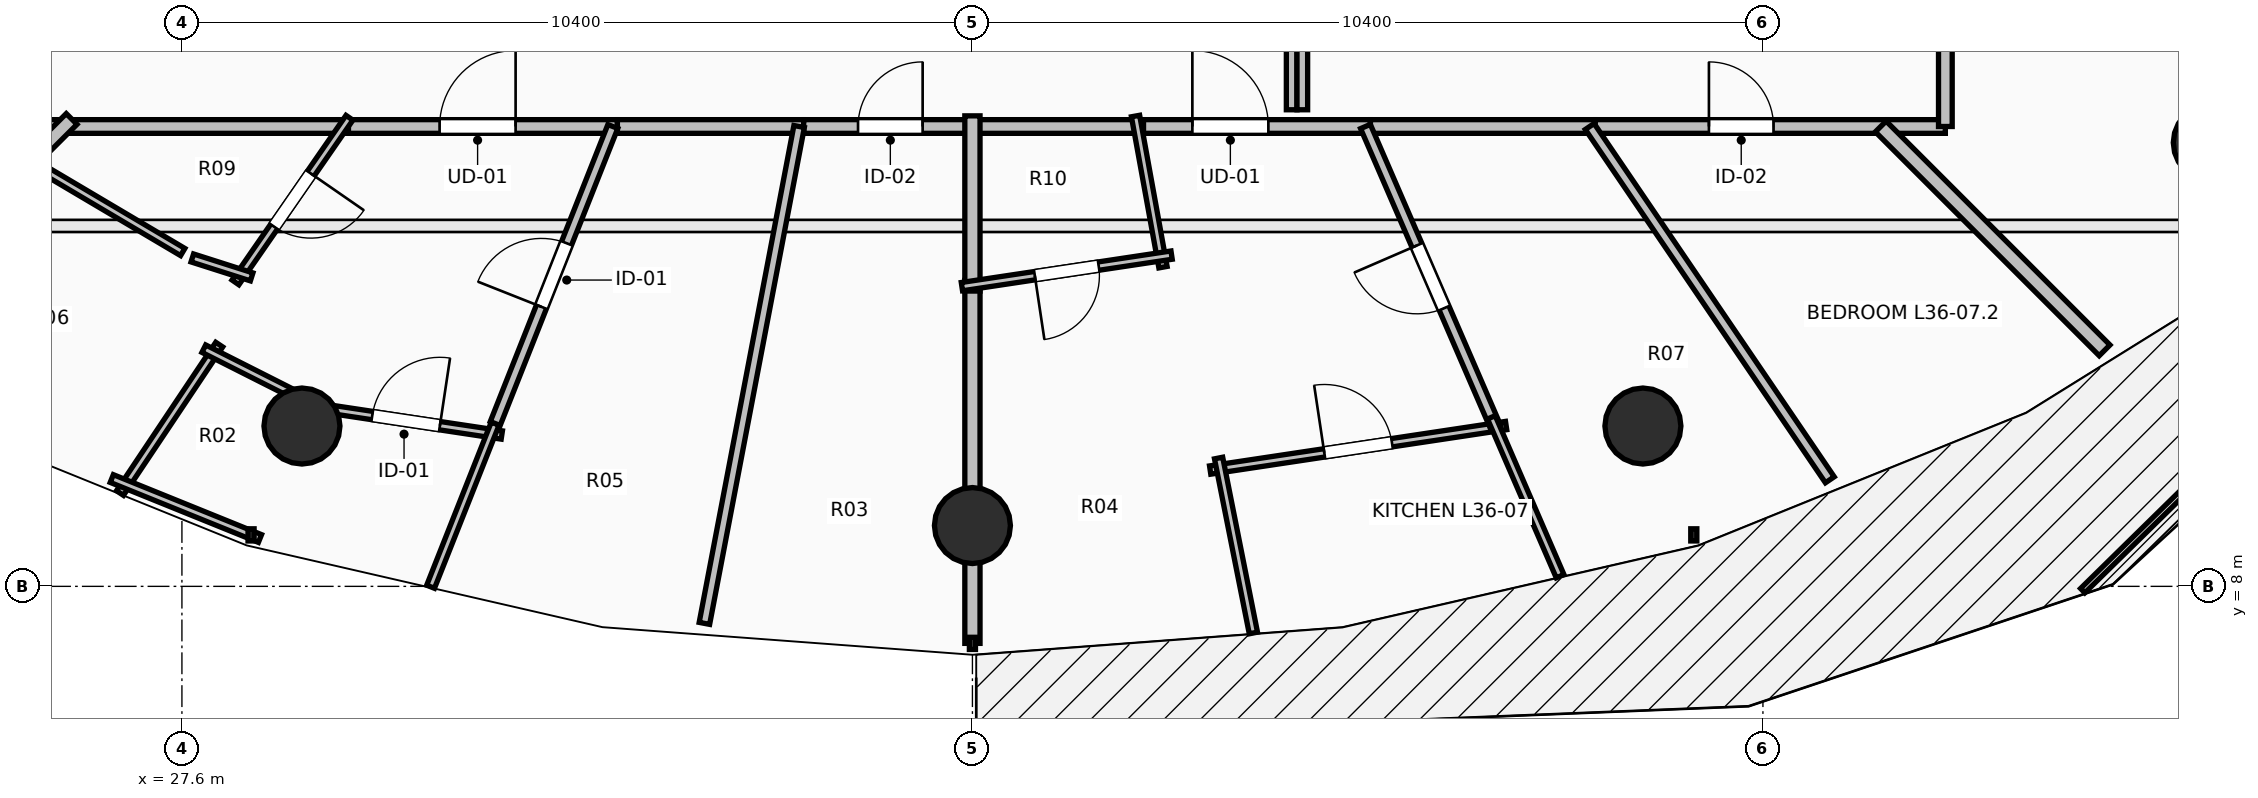
"""IFC4 building model, lengths in metres.
Left out: names, types, materials, properties, quantities, classifications, styles, units other than length and angle.
Written with IfcOpenShell. Run it as: python <this file> out.ifc"""

import sys

from ifc_helpers import new_model, si_unit, direction, frame, frame_2d, origin, origin_2d, place, context, subcontext, project, spatial, rectangle, circle, extrude, element, fill, save


model = new_model("IFC4")
c1 = context("Model", 3, precision=1e-05, world=origin(), true_north=direction((0.0, 1.0)))
c2 = subcontext(c1, "Body", "Model", "MODEL_VIEW")
j1 = project(units=[si_unit("LENGTHUNIT", "METRE"), si_unit("PLANEANGLEUNIT", "RADIAN")], contexts=[c1])
p1 = place(None, origin())
s1 = spatial("IfcSite", under=j1, at=p1, CompositionType="ELEMENT")
p2 = place(p1, origin())
s2 = spatial("IfcBuilding", under=s1, at=p2, CompositionType="ELEMENT")
p3 = place(p2, frame((0.0, 0.0, 136.1)))
s3 = spatial("IfcBuildingStorey", under=s2, at=p3, CompositionType="ELEMENT", Elevation=136.1)
for number, where, z_axis, x_axis in (
    (1, (29.179, 10.109, 0.0), (0.0, 0.0, 1.0), (-0.383, -0.924, 0.0)),
    (2, (38.0, 8.8, 0.0), (0.0, 0.0, 1.0), (0.0, -1.0, 0.0)),
    (3, (46.821, 10.109, 0.0), (0.0, 0.0, 1.0), (0.383, -0.924, 0.0)),
    (4, (54.299, 13.838, 0.0), (0.0, 0.0, 1.0), (0.707, -0.707, 0.0)),
):
    element("IfcColumn", number, at=place(p3, frame(where, z_axis=z_axis, x_axis=x_axis)), inside=s3, PredefinedType="COLUMN", context=c2, shape_type="SweptSolid", body=[
        extrude(circle(Radius=0.5, at=origin_2d()), origin(), (0.0, 0.0, 1.0), 3.5),
    ])
p4 = place(p3, frame((25.2, 14.05, 0.0), z_axis=(0.0, 0.0, 1.0), x_axis=(1.0, 0.0, 0.0)))
e5 = element("IfcWall", 5, at=p4, inside=s3, PredefinedType="PARTITIONING", context=c2, shape_type="SweptSolid", body=[
    extrude(rectangle(XDim=0.91, YDim=0.18, at=frame_2d((0.455, 0.0))), origin(), (0.0, 0.0, 1.0), 2.874),
])
p5 = place(p3, frame((29.651, 14.05, 0.0), z_axis=(0.0, 0.0, 1.0), x_axis=(1.0, 0.0, 0.0)))
e6 = element("IfcWall", 6, at=p5, inside=s3, PredefinedType="PARTITIONING", context=c2, shape_type="SweptSolid", body=[
    extrude(rectangle(XDim=3.678, YDim=0.18, at=frame_2d((1.839, 0.0))), origin(), (0.0, 0.0, 1.0), 2.922),
])
p6 = place(p5, frame((1.339, 0.0, 0.0)))
e7 = element("IfcOpeningElement", 7, at=p6, cuts=e6, PredefinedType="OPENING", context=c2, shape_type="SweptSolid", body=[
    extrude(rectangle(XDim=1.0, YDim=2.15, at=frame_2d((0.5, 1.075))), frame((0.0, 0.105, 0.0), z_axis=(0.0, -1.0, 0.0), x_axis=(1.0, 0.0, 0.0)), (0.0, 0.0, 1.0), 0.21),
])
p7 = place(p3, frame((25.97, 14.05, 0.0), z_axis=(0.0, 0.0, 1.0), x_axis=(1.0, 0.0, 0.0)))
e8 = element("IfcWall", 8, at=p7, inside=s3, PredefinedType="PARTITIONING", context=c2, shape_type="SweptSolid", body=[
    extrude(rectangle(XDim=3.821, YDim=0.18, at=frame_2d((1.911, 0.0))), origin(), (0.0, 0.0, 1.0), 2.432),
])
p8 = place(p3, frame((33.329, 14.05, 0.0), z_axis=(0.0, 0.0, 1.0), x_axis=(1.0, 0.0, 0.0)))
e9 = element("IfcWall", 9, at=p8, inside=s3, PredefinedType="PARTITIONING", context=c2, shape_type="SweptSolid", body=[
    extrude(rectangle(XDim=2.451, YDim=0.18, at=frame_2d((1.226, 0.0))), origin(), (0.0, 0.0, 1.0), 2.922),
])
p9 = place(p3, frame((35.78, 14.05, 0.0), z_axis=(0.0, 0.0, 1.0), x_axis=(1.0, 0.0, 0.0)))
e10 = element("IfcWall", 10, at=p9, inside=s3, PredefinedType="PARTITIONING", context=c2, shape_type="SweptSolid", body=[
    extrude(rectangle(XDim=2.28, YDim=0.18, at=frame_2d((1.14, 0.0))), origin(), (0.0, 0.0, 1.0), 2.922),
])
p10 = place(p9, frame((0.715, 0.0, 0.0)))
e11 = element("IfcOpeningElement", 11, at=p10, cuts=e10, PredefinedType="OPENING", context=c2, shape_type="SweptSolid", body=[
    extrude(rectangle(XDim=0.85, YDim=2.1, at=frame_2d((0.425, 1.05))), frame((0.0, 0.105, 0.0), z_axis=(0.0, -1.0, 0.0), x_axis=(1.0, 0.0, 0.0)), (0.0, 0.0, 1.0), 0.21),
])
p11 = place(p3, frame((40.111, 14.05, 0.0), z_axis=(0.0, 0.0, 1.0), x_axis=(1.0, 0.0, 0.0)))
e12 = element("IfcWall", 12, at=p11, inside=s3, PredefinedType="PARTITIONING", context=c2, shape_type="SweptSolid", body=[
    extrude(rectangle(XDim=3.125, YDim=0.18, at=frame_2d((1.562, 0.0))), origin(), (0.0, 0.0, 1.0), 3.24),
])
p12 = place(p11, frame((0.782, 0.0, 0.0)))
e13 = element("IfcOpeningElement", 13, at=p12, cuts=e12, PredefinedType="OPENING", context=c2, shape_type="SweptSolid", body=[
    extrude(rectangle(XDim=1.0, YDim=2.15, at=frame_2d((0.5, 1.075))), frame((0.0, 0.105, 0.0), z_axis=(0.0, -1.0, 0.0), x_axis=(1.0, 0.0, 0.0)), (0.0, 0.0, 1.0), 0.21),
])
p13 = place(p3, frame((37.92, 14.05, 0.0), z_axis=(0.0, 0.0, 1.0), x_axis=(1.0, 0.0, 0.0)))
e14 = element("IfcWall", 14, at=p13, inside=s3, PredefinedType="PARTITIONING", context=c2, shape_type="SweptSolid", body=[
    extrude(rectangle(XDim=2.331, YDim=0.18, at=frame_2d((1.166, 0.0))), origin(), (0.0, 0.0, 1.0), 2.922),
])
p14 = place(p3, frame((43.236, 14.05, 0.0), z_axis=(0.0, 0.0, 1.0), x_axis=(1.0, 0.0, 0.0)))
e15 = element("IfcWall", 15, at=p14, inside=s3, PredefinedType="PARTITIONING", context=c2, shape_type="SweptSolid", body=[
    extrude(rectangle(XDim=2.958, YDim=0.18, at=frame_2d((1.479, 0.0))), origin(), (0.0, 0.0, 1.0), 2.432),
])
p15 = place(p3, frame((46.194, 14.05, 0.0), z_axis=(0.0, 0.0, 1.0), x_axis=(1.0, 0.0, 0.0)))
e16 = element("IfcWall", 16, at=p15, inside=s3, PredefinedType="PARTITIONING", context=c2, shape_type="SweptSolid", body=[
    extrude(rectangle(XDim=3.841, YDim=0.18, at=frame_2d((1.92, 0.0))), origin(), (0.0, 0.0, 1.0), 2.432),
])
p16 = place(p15, frame((1.496, 0.0, 0.0)))
e17 = element("IfcOpeningElement", 17, at=p16, cuts=e16, PredefinedType="OPENING", context=c2, shape_type="SweptSolid", body=[
    extrude(rectangle(XDim=0.85, YDim=2.1, at=frame_2d((0.425, 1.05))), frame((0.0, 0.105, 0.0), z_axis=(0.0, -1.0, 0.0), x_axis=(1.0, 0.0, 0.0)), (0.0, 0.0, 1.0), 0.21),
])
p17 = place(p3, frame((50.035, 14.05, 0.0), z_axis=(0.0, 0.0, 1.0), x_axis=(1.0, 0.0, 0.0)))
e18 = element("IfcWall", 18, at=p17, inside=s3, PredefinedType="PARTITIONING", context=c2, shape_type="SweptSolid", body=[
    extrude(rectangle(XDim=0.765, YDim=0.18, at=frame_2d((0.383, 0.0))), origin(), (0.0, 0.0, 1.0), 2.874),
])
p18 = place(p3, frame((50.8, 14.05, 0.0), z_axis=(0.0, 0.0, 1.0), x_axis=(0.0, 1.0, 0.0)))
e19 = element("IfcWall", 19, at=p18, inside=s3, PredefinedType="PARTITIONING", context=c2, shape_type="SweptSolid", body=[
    extrude(rectangle(XDim=10.5, YDim=0.18, at=frame_2d((5.25, 0.0))), origin(), (0.0, 0.0, 1.0), 2.432),
])
p19 = place(p18, frame((4.75, 0.0, 0.0)))
e20 = element("IfcOpeningElement", 20, at=p19, cuts=e19, PredefinedType="OPENING", context=c2, shape_type="SweptSolid", body=[
    extrude(rectangle(XDim=1.0, YDim=2.15, at=frame_2d((0.5, 1.075))), frame((0.0, 0.105, 0.0), z_axis=(0.0, -1.0, 0.0), x_axis=(1.0, 0.0, 0.0)), (0.0, 0.0, 1.0), 0.21),
])
p20 = place(p3, frame((25.538, 13.538, 0.0), z_axis=(0.0, 0.0, 1.0), x_axis=(0.707106781187, 0.707106781187, 0.0)))
e21 = element("IfcWall", 21, at=p20, inside=s3, PredefinedType="PARTITIONING", context=c2, shape_type="SweptSolid", body=[
    extrude(rectangle(XDim=0.864, YDim=0.2, at=frame_2d((0.432, 0.0))), origin(), (0.0, 0.0, 1.0), 2.874),
])
p21 = place(p3, frame((29.804, 14.165, 0.0), z_axis=(0.0, 0.0, 1.0), x_axis=(-0.569156972472, -0.822228885826, 0.0)))
e22 = element("IfcWall", 22, at=p21, inside=s3, PredefinedType="PARTITIONING", context=c2, shape_type="SweptSolid", body=[
    extrude(rectangle(XDim=2.635, YDim=0.11, at=frame_2d((1.317, 0.0))), origin(), (0.0, 0.0, 1.0), 2.432),
])
p22 = place(p21, frame((0.892, 0.0, 0.0)))
e23 = element("IfcOpeningElement", 23, at=p22, cuts=e22, PredefinedType="OPENING", context=c2, shape_type="SweptSolid", body=[
    extrude(rectangle(XDim=0.85, YDim=2.1, at=frame_2d((0.425, 1.05))), frame((0.0, 0.07, 0.0), z_axis=(0.0, -1.0, 0.0), x_axis=(1.0, 0.0, 0.0)), (0.0, 0.0, 1.0), 0.14),
])
p23 = place(p3, frame((28.517, 12.071, 0.0), z_axis=(0.0, 0.0, 1.0), x_axis=(-0.952627998304, 0.304137956932, 0.0)))
e24 = element("IfcWall", 24, at=p23, inside=s3, PredefinedType="PARTITIONING", context=c2, shape_type="SweptSolid", body=[
    extrude(rectangle(XDim=0.82, YDim=0.11, at=frame_2d((0.41, 0.0))), origin(), (0.0, 0.0, 1.0), 2.432),
])
p24 = place(p3, frame((27.611, 12.399, 0.0), z_axis=(0.0, 0.0, 1.0), x_axis=(-0.860546797705, 0.509371386082, 0.0)))
e25 = element("IfcWall", 25, at=p24, inside=s3, PredefinedType="PARTITIONING", context=c2, shape_type="SweptSolid", body=[
    extrude(rectangle(XDim=2.485, YDim=0.11, at=frame_2d((1.242, 0.0))), origin(), (0.0, 0.0, 1.0), 2.874),
])
p25 = place(p3, frame((26.785, 9.228, 0.0), z_axis=(0.0, 0.0, 1.0), x_axis=(0.555802936367, 0.831314077786, 0.0)))
e26 = element("IfcWall", 26, at=p25, inside=s3, PredefinedType="PARTITIONING", context=c2, shape_type="SweptSolid", body=[
    extrude(rectangle(XDim=2.349, YDim=0.11, at=frame_2d((1.175, 0.0))), origin(), (0.0, 0.0, 1.0), 2.728),
])
p26 = place(p3, frame((27.888, 11.127, 0.0), z_axis=(0.0, 0.0, 1.0), x_axis=(0.892534718882, -0.450978686403, 0.0)))
e27 = element("IfcWall", 27, at=p26, inside=s3, PredefinedType="PARTITIONING", context=c2, shape_type="SweptSolid", body=[
    extrude(rectangle(XDim=1.865, YDim=0.11, at=frame_2d((0.933, 0.0))), origin(), (0.0, 0.0, 1.0), 2.432),
])
p27 = place(p3, frame((29.29, 10.37, 0.0), z_axis=(0.0, 0.0, 1.0), x_axis=(0.988887788943, -0.148663851958, 0.0)))
e28 = element("IfcWall", 28, at=p27, inside=s3, PredefinedType="PARTITIONING", context=c2, shape_type="SweptSolid", body=[
    extrude(rectangle(XDim=2.547, YDim=0.11, at=frame_2d((1.273, 0.0))), origin(), (0.0, 0.0, 1.0), 3.24),
])
p28 = place(p27, frame((0.823, 0.0, 0.0)))
e29 = element("IfcOpeningElement", 29, at=p28, cuts=e28, PredefinedType="OPENING", context=c2, shape_type="SweptSolid", body=[
    extrude(rectangle(XDim=0.9, YDim=2.1, at=frame_2d((0.45, 1.05))), frame((0.0, 0.07, 0.0), z_axis=(0.0, -1.0, 0.0), x_axis=(1.0, 0.0, 0.0)), (0.0, 0.0, 1.0), 0.14),
])
p29 = place(p3, frame((31.721, 10.142, 0.0), z_axis=(0.0, 0.0, 1.0), x_axis=(-0.368016079814, -0.929819426017, 0.0)))
e30 = element("IfcWall", 30, at=p29, inside=s3, PredefinedType="PARTITIONING", context=c2, shape_type="SweptSolid", body=[
    extrude(rectangle(XDim=2.309, YDim=0.11, at=frame_2d((1.155, 0.0))), origin(), (0.0, 0.0, 1.0), 2.728),
])
p30 = place(p3, frame((26.677, 9.418, 0.0), z_axis=(0.0, 0.0, 1.0), x_axis=(0.926947774479, -0.375190382857, 0.0)))
e31 = element("IfcWall", 31, at=p30, inside=s3, PredefinedType="PARTITIONING", context=c2, shape_type="SweptSolid", body=[
    extrude(rectangle(XDim=2.103, YDim=0.11, at=frame_2d((1.052, 0.0))), origin(), (0.0, 0.0, 1.0), 3.24),
])
p31 = place(p3, frame((31.722, 10.142, 0.0), z_axis=(0.0, 0.0, 1.0), x_axis=(0.368143652048, 0.929768923688, 0.0)))
e32 = element("IfcWall", 32, at=p31, inside=s3, PredefinedType="PARTITIONING", context=c2, shape_type="SweptSolid", body=[
    extrude(rectangle(XDim=4.203, YDim=0.14, at=frame_2d((2.102, 0.0))), origin(), (0.0, 0.0, 1.0), 2.874),
])
p32 = place(p31, frame((1.652, 0.0, 0.0)))
e33 = element("IfcOpeningElement", 33, at=p32, cuts=e32, PredefinedType="OPENING", context=c2, shape_type="SweptSolid", body=[
    extrude(rectangle(XDim=0.9, YDim=2.1, at=frame_2d((0.45, 1.05))), frame((0.0, 0.085, 0.0), z_axis=(0.0, -1.0, 0.0), x_axis=(1.0, 0.0, 0.0)), (0.0, 0.0, 1.0), 0.17),
])
p33 = place(p3, frame((34.474, 7.513, 0.0), z_axis=(0.0, 0.0, 1.0), x_axis=(0.187211570084, 0.982319616025, 0.0)))
e34 = element("IfcWall", 34, at=p33, inside=s3, PredefinedType="PARTITIONING", context=c2, shape_type="SweptSolid", body=[
    extrude(rectangle(XDim=6.655, YDim=0.14, at=frame_2d((3.327, 0.0))), origin(), (0.0, 0.0, 1.0), 2.728),
])
p34 = place(p3, frame((38.0, 7.25, 0.0), z_axis=(0.0, 0.0, 1.0), x_axis=(0.0, 1.0, 0.0)))
e35 = element("IfcWall", 35, at=p34, inside=s3, PredefinedType="PARTITIONING", context=c2, shape_type="SweptSolid", body=[
    extrude(rectangle(XDim=4.775, YDim=0.2, at=frame_2d((2.387, 0.0))), origin(), (0.0, 0.0, 1.0), 2.874),
])
p35 = place(p3, frame((38.0, 11.885, 0.0), z_axis=(0.0, 0.0, 1.0), x_axis=(0.0, 1.0, 0.0)))
e36 = element("IfcWall", 36, at=p35, inside=s3, PredefinedType="PARTITIONING", context=c2, shape_type="SweptSolid", body=[
    extrude(rectangle(XDim=2.305, YDim=0.2, at=frame_2d((1.152, 0.0))), origin(), (0.0, 0.0, 1.0), 2.922),
])
p36 = place(p3, frame((40.146, 14.188, 0.0), z_axis=(0.0, 0.0, 1.0), x_axis=(0.178662196449, -0.983910473346, 0.0)))
e37 = element("IfcWall", 37, at=p36, inside=s3, PredefinedType="PARTITIONING", context=c2, shape_type="SweptSolid", body=[
    extrude(rectangle(XDim=2.021, YDim=0.11, at=frame_2d((1.01, 0.0))), origin(), (0.0, 0.0, 1.0), 2.922),
])
p37 = place(p3, frame((40.62, 12.358, 0.0), z_axis=(0.0, 0.0, 1.0), x_axis=(-0.988884941862, -0.148682789046, 0.0)))
e38 = element("IfcWall", 38, at=p37, inside=s3, PredefinedType="PARTITIONING", context=c2, shape_type="SweptSolid", body=[
    extrude(rectangle(XDim=2.79, YDim=0.11, at=frame_2d((1.395, 0.0))), origin(), (0.0, 0.0, 1.0), 3.24),
])
p38 = place(p37, frame((0.97, 0.0, 0.0)))
e39 = element("IfcOpeningElement", 39, at=p38, cuts=e38, PredefinedType="OPENING", context=c2, shape_type="SweptSolid", body=[
    extrude(rectangle(XDim=0.85, YDim=2.1, at=frame_2d((0.425, 1.05))), frame((0.0, 0.07, 0.0), z_axis=(0.0, -1.0, 0.0), x_axis=(1.0, 0.0, 0.0)), (0.0, 0.0, 1.0), 0.14),
])
p39 = place(p3, frame((41.128, 9.53, 0.0), z_axis=(0.0, 0.0, 1.0), x_axis=(0.988884902331, 0.148683051965, 0.0)))
e40 = element("IfcWall", 40, at=p39, inside=s3, PredefinedType="PARTITIONING", context=c2, shape_type="SweptSolid", body=[
    extrude(rectangle(XDim=3.938, YDim=0.11, at=frame_2d((1.969, 0.0))), origin(), (0.0, 0.0, 1.0), 3.24),
])
p40 = place(p39, frame((1.519, 0.0, 0.0)))
e41 = element("IfcOpeningElement", 41, at=p40, cuts=e40, PredefinedType="OPENING", context=c2, shape_type="SweptSolid", body=[
    extrude(rectangle(XDim=0.9, YDim=2.1, at=frame_2d((0.45, 1.05))), frame((0.0, 0.07, 0.0), z_axis=(0.0, -1.0, 0.0), x_axis=(1.0, 0.0, 0.0)), (0.0, 0.0, 1.0), 0.14),
])
p41 = place(p3, frame((41.696, 7.387, 0.0), z_axis=(0.0, 0.0, 1.0), x_axis=(-0.194975537261, 0.980808105528, 0.0)))
e42 = element("IfcWall", 42, at=p41, inside=s3, PredefinedType="PARTITIONING", context=c2, shape_type="SweptSolid", body=[
    extrude(rectangle(XDim=2.346, YDim=0.11, at=frame_2d((1.173, 0.0))), origin(), (0.0, 0.0, 1.0), 2.728),
])
p42 = place(p3, frame((44.883, 10.095, 0.0), z_axis=(0.0, 0.0, 1.0), x_axis=(-0.397273563399, 0.917700232006, 0.0)))
e43 = element("IfcWall", 43, at=p42, inside=s3, PredefinedType="PARTITIONING", context=c2, shape_type="SweptSolid", body=[
    extrude(rectangle(XDim=4.31, YDim=0.14, at=frame_2d((2.155, 0.0))), origin(), (0.0, 0.0, 1.0), 2.432),
])
p43 = place(p42, frame((1.705, 0.0, 0.0)))
e44 = element("IfcOpeningElement", 44, at=p43, cuts=e43, PredefinedType="OPENING", context=c2, shape_type="SweptSolid", body=[
    extrude(rectangle(XDim=0.9, YDim=2.1, at=frame_2d((0.45, 1.05))), frame((0.0, 0.085, 0.0), z_axis=(0.0, -1.0, 0.0), x_axis=(1.0, 0.0, 0.0)), (0.0, 0.0, 1.0), 0.17),
])
p44 = place(p3, frame((45.732, 8.134, 0.0), z_axis=(0.0, 0.0, 1.0), x_axis=(-0.397125966554, 0.91776411277, 0.0)))
e45 = element("IfcWall", 45, at=p44, inside=s3, PredefinedType="PARTITIONING", context=c2, shape_type="SweptSolid", body=[
    extrude(rectangle(XDim=2.277, YDim=0.11, at=frame_2d((1.139, 0.0))), origin(), (0.0, 0.0, 1.0), 2.728),
])
p45 = place(p3, frame((49.28, 9.402, 0.0), z_axis=(0.0, 0.0, 1.0), x_axis=(-0.562106811751, 0.827064648128, 0.0)))
e46 = element("IfcWall", 46, at=p45, inside=s3, PredefinedType="PARTITIONING", context=c2, shape_type="SweptSolid", body=[
    extrude(rectangle(XDim=5.62, YDim=0.14, at=frame_2d((2.81, 0.0))), origin(), (0.0, 0.0, 1.0), 2.432),
])
p46 = place(p3, frame((52.895, 11.105, 0.0), z_axis=(0.0, 0.0, 1.0), x_axis=(-0.707106781187, 0.707106781187, 0.0)))
e47 = element("IfcWall", 47, at=p46, inside=s3, PredefinedType="PARTITIONING", context=c2, shape_type="SweptSolid", body=[
    extrude(rectangle(XDim=4.165, YDim=0.2, at=frame_2d((2.083, 0.0))), origin(), (0.0, 0.0, 1.0), 2.728),
])
for number, where, z_axis, x_axis in (
    (48, (42.2, 16.1, 0.0), (0.0, 0.0, 1.0), (0.0, -1.0, 0.0)),
    (49, (42.34, 14.27, 0.0), (0.0, 0.0, 1.0), (0.0, 1.0, 0.0)),
):
    element("IfcWall", number, at=place(p3, frame(where, z_axis=z_axis, x_axis=x_axis)), inside=s3, PredefinedType="PARTITIONING", context=c2, shape_type="SweptSolid", body=[
        extrude(rectangle(XDim=1.83, YDim=0.14, at=frame_2d((0.915, 0.0))), origin(), (0.0, 0.0, 1.0), 3.24),
    ])
p47 = place(p6, origin())
e50 = element("IfcDoor", 50, at=p47, inside=s3, OperationType="SINGLE_SWING_RIGHT", PredefinedType="DOOR", context=c2, shape_type="SweptSolid", body=[
    extrude(rectangle(XDim=1.0, YDim=2.15, at=frame_2d((0.5, 1.075))), frame((0.0, 0.025, 0.0), z_axis=(0.0, -1.0, 0.0), x_axis=(1.0, 0.0, 0.0)), (0.0, 0.0, 1.0), 0.05),
])
fill(e7, e50)
p48 = place(p12, origin())
e51 = element("IfcDoor", 51, at=p48, inside=s3, OperationType="SINGLE_SWING_LEFT", PredefinedType="DOOR", context=c2, shape_type="SweptSolid", body=[
    extrude(rectangle(XDim=1.0, YDim=2.15, at=frame_2d((0.5, 1.075))), frame((0.0, 0.025, 0.0), z_axis=(0.0, -1.0, 0.0), x_axis=(1.0, 0.0, 0.0)), (0.0, 0.0, 1.0), 0.05),
])
fill(e13, e51)
p49 = place(p22, origin())
e52 = element("IfcDoor", 52, at=p49, inside=s3, OperationType="SINGLE_SWING_LEFT", PredefinedType="DOOR", context=c2, shape_type="SweptSolid", body=[
    extrude(rectangle(XDim=0.85, YDim=2.1, at=frame_2d((0.425, 1.05))), frame((0.0, 0.025, 0.0), z_axis=(0.0, -1.0, 0.0), x_axis=(1.0, 0.0, 0.0)), (0.0, 0.0, 1.0), 0.05),
])
fill(e23, e52)
p50 = place(p28, origin())
e53 = element("IfcDoor", 53, at=p50, inside=s3, OperationType="SINGLE_SWING_RIGHT", PredefinedType="DOOR", context=c2, shape_type="SweptSolid", body=[
    extrude(rectangle(XDim=0.9, YDim=2.1, at=frame_2d((0.45, 1.05))), frame((0.0, 0.025, 0.0), z_axis=(0.0, -1.0, 0.0), x_axis=(1.0, 0.0, 0.0)), (0.0, 0.0, 1.0), 0.05),
])
fill(e29, e53)
p51 = place(p32, origin())
e54 = element("IfcDoor", 54, at=p51, inside=s3, OperationType="SINGLE_SWING_LEFT", PredefinedType="DOOR", context=c2, shape_type="SweptSolid", body=[
    extrude(rectangle(XDim=0.9, YDim=2.1, at=frame_2d((0.45, 1.05))), frame((0.0, 0.025, 0.0), z_axis=(0.0, -1.0, 0.0), x_axis=(1.0, 0.0, 0.0)), (0.0, 0.0, 1.0), 0.05),
])
fill(e33, e54)
p52 = place(p38, origin())
e55 = element("IfcDoor", 55, at=p52, inside=s3, OperationType="SINGLE_SWING_RIGHT", PredefinedType="DOOR", context=c2, shape_type="SweptSolid", body=[
    extrude(rectangle(XDim=0.85, YDim=2.1, at=frame_2d((0.425, 1.05))), frame((0.0, 0.025, 0.0), z_axis=(0.0, -1.0, 0.0), x_axis=(1.0, 0.0, 0.0)), (0.0, 0.0, 1.0), 0.05),
])
fill(e39, e55)
p53 = place(p40, origin())
e56 = element("IfcDoor", 56, at=p53, inside=s3, OperationType="SINGLE_SWING_LEFT", PredefinedType="DOOR", context=c2, shape_type="SweptSolid", body=[
    extrude(rectangle(XDim=0.9, YDim=2.1, at=frame_2d((0.45, 1.05))), frame((0.0, 0.025, 0.0), z_axis=(0.0, -1.0, 0.0), x_axis=(1.0, 0.0, 0.0)), (0.0, 0.0, 1.0), 0.05),
])
fill(e41, e56)
p54 = place(p43, origin())
e57 = element("IfcDoor", 57, at=p54, inside=s3, OperationType="SINGLE_SWING_RIGHT", PredefinedType="DOOR", context=c2, shape_type="SweptSolid", body=[
    extrude(rectangle(XDim=0.9, YDim=2.1, at=frame_2d((0.45, 1.05))), frame((0.0, 0.025, 0.0), z_axis=(0.0, -1.0, 0.0), x_axis=(1.0, 0.0, 0.0)), (0.0, 0.0, 1.0), 0.05),
])
fill(e44, e57)
p55 = place(p10, origin())
e58 = element("IfcDoor", 58, at=p55, inside=s3, OperationType="SINGLE_SWING_RIGHT", PredefinedType="DOOR", context=c2, shape_type="SweptSolid", body=[
    extrude(rectangle(XDim=0.85, YDim=2.1, at=frame_2d((0.425, 1.05))), frame((0.0, 0.025, 0.0), z_axis=(0.0, -1.0, 0.0), x_axis=(1.0, 0.0, 0.0)), (0.0, 0.0, 1.0), 0.05),
])
fill(e11, e58)
p56 = place(p16, origin())
e59 = element("IfcDoor", 59, at=p56, inside=s3, OperationType="SINGLE_SWING_LEFT", PredefinedType="DOOR", context=c2, shape_type="SweptSolid", body=[
    extrude(rectangle(XDim=0.85, YDim=2.1, at=frame_2d((0.425, 1.05))), frame((0.0, 0.025, 0.0), z_axis=(0.0, -1.0, 0.0), x_axis=(1.0, 0.0, 0.0)), (0.0, 0.0, 1.0), 0.05),
])
fill(e17, e59)
save(model, sys.argv[1])
